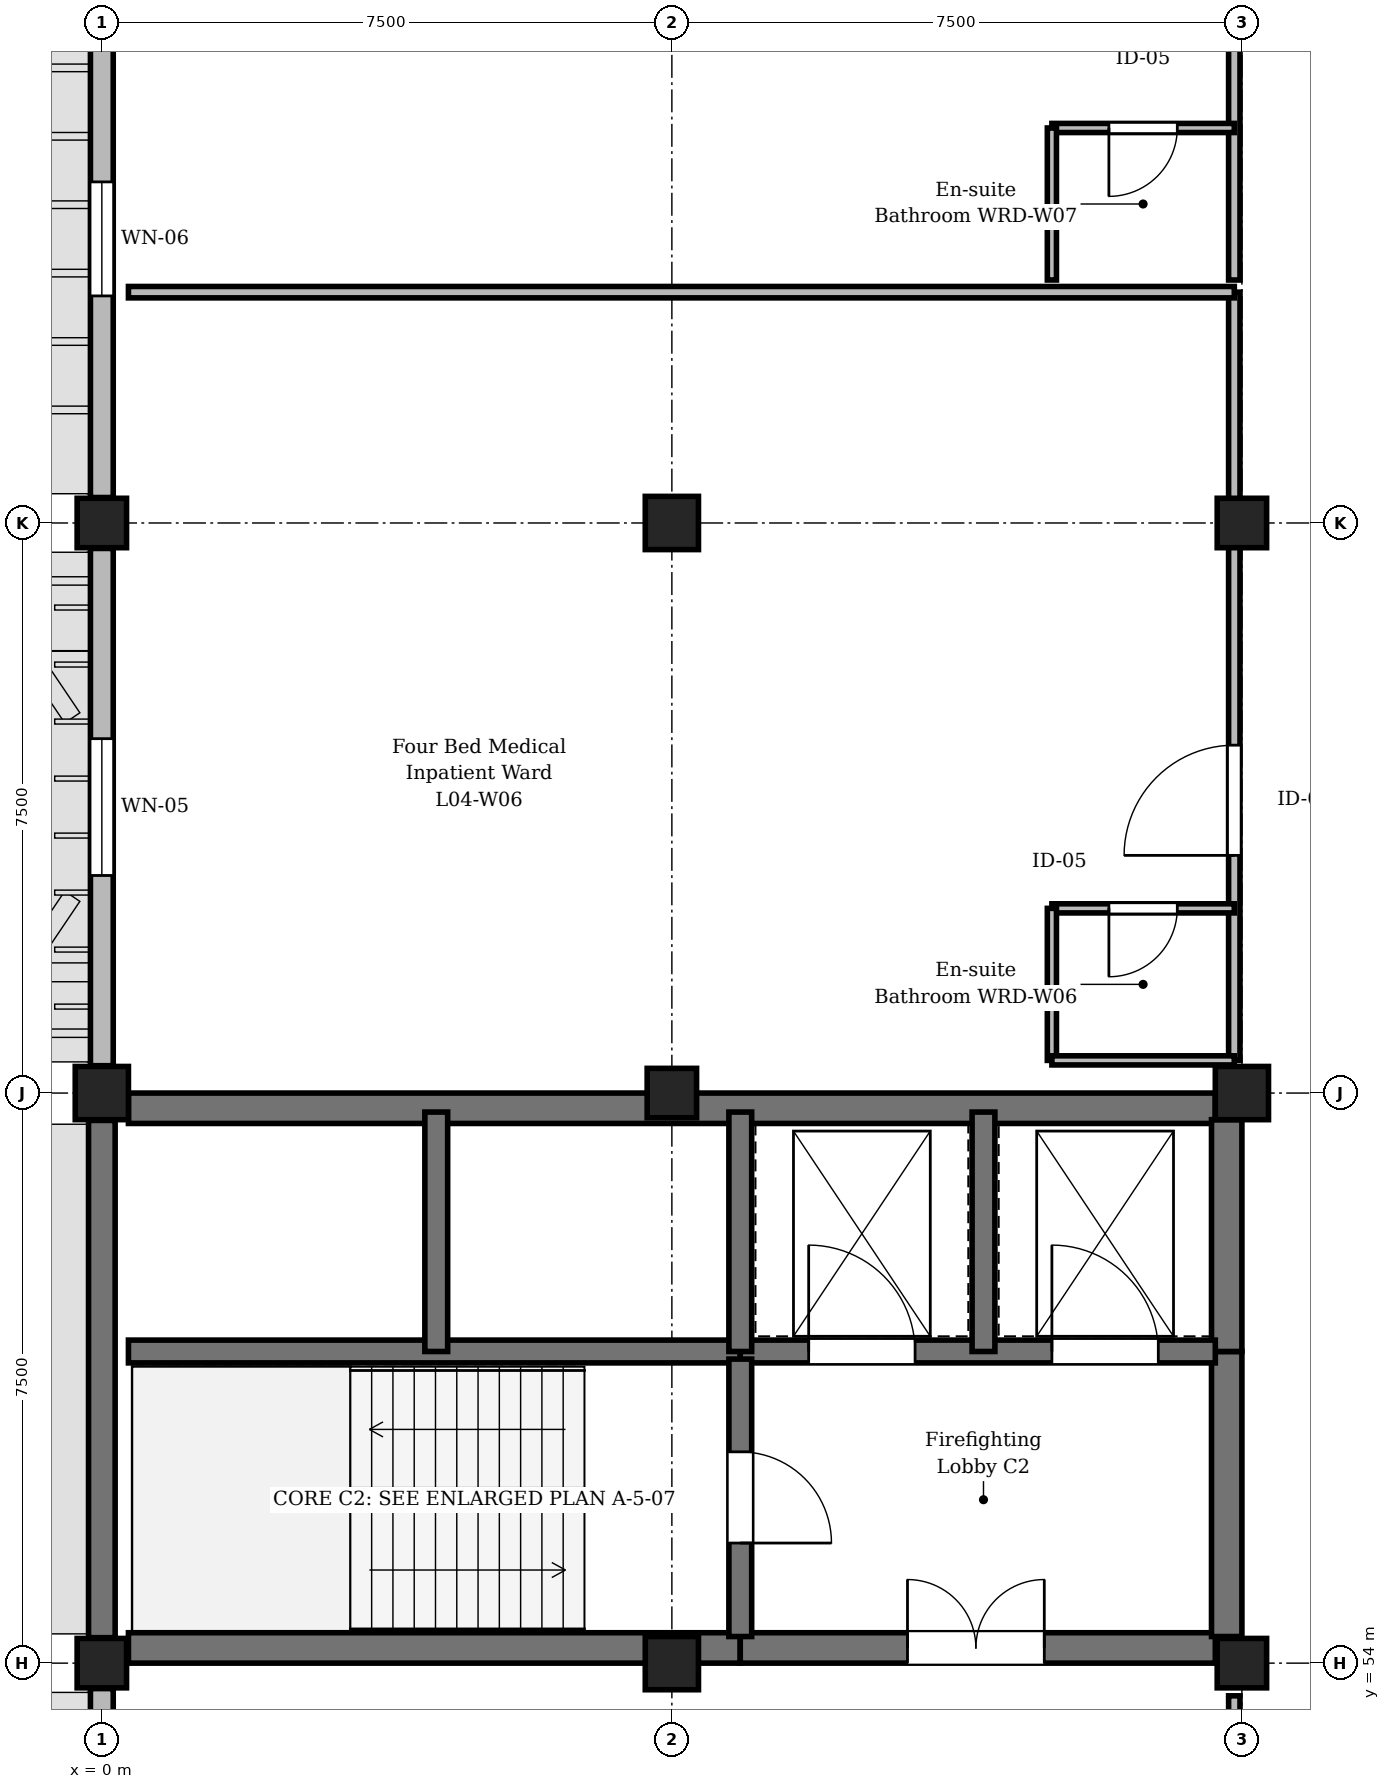
"""IFC4 building model, lengths in metres.
Left out: names, types, materials, properties, quantities, classifications, styles, units other than length and angle.
Written with IfcOpenShell. Run it as: python <this file> out.ifc"""

import sys

from ifc_helpers import new_model, si_unit, direction, frame, frame_2d, origin, origin_2d, place, context, subcontext, project, spatial, rectangle, extrude, element, fill, save


model = new_model("IFC4")
c1 = context("Model", 3, precision=1e-05, world=origin(), true_north=direction((0.0, 1.0)))
c2 = subcontext(c1, "Body", "Model", "MODEL_VIEW")
j1 = project(units=[si_unit("LENGTHUNIT", "METRE"), si_unit("PLANEANGLEUNIT", "RADIAN")], contexts=[c1])
p1 = place(None, origin())
s1 = spatial("IfcSite", under=j1, at=p1, CompositionType="ELEMENT")
p2 = place(p1, origin())
s2 = spatial("IfcBuilding", under=s1, at=p2, CompositionType="ELEMENT")
p3 = place(p2, frame((0.0, 0.0, 17.85)))
s3 = spatial("IfcBuildingStorey", under=s2, at=p3, CompositionType="ELEMENT", Elevation=17.85)
p4 = place(p3, frame((0.0, 54.0, 0.0), z_axis=(0.0, 0.0, 1.0), x_axis=(1.0, 0.0, 0.0)))
e1 = element("IfcColumn", 1, at=p4, inside=s3, PredefinedType="COLUMN", context=c2, shape_type="SweptSolid", body=[
    extrude(rectangle(XDim=0.65, YDim=0.65, at=origin_2d()), origin(), (0.0, 0.0, 1.0), 4.05),
])
p5 = place(p3, frame((0.0, 61.5, 0.0), z_axis=(0.0, 0.0, 1.0), x_axis=(1.0, 0.0, 0.0)))
e2 = element("IfcColumn", 2, at=p5, inside=s3, PredefinedType="COLUMN", context=c2, shape_type="SweptSolid", body=[
    extrude(rectangle(XDim=0.7, YDim=0.7, at=origin_2d()), origin(), (0.0, 0.0, 1.0), 4.05),
])
p6 = place(p3, frame((0.0, 69.0, 0.0), z_axis=(0.0, 0.0, 1.0), x_axis=(1.0, 0.0, 0.0)))
e3 = element("IfcColumn", 3, at=p6, inside=s3, PredefinedType="COLUMN", context=c2, shape_type="SweptSolid", body=[
    extrude(rectangle(XDim=0.65, YDim=0.65, at=origin_2d()), origin(), (0.0, 0.0, 1.0), 4.05),
])
p7 = place(p3, frame((7.5, 54.0, 0.0), z_axis=(0.0, 0.0, 1.0), x_axis=(1.0, 0.0, 0.0)))
e4 = element("IfcColumn", 4, at=p7, inside=s3, PredefinedType="COLUMN", context=c2, shape_type="SweptSolid", body=[
    extrude(rectangle(XDim=0.7, YDim=0.7, at=origin_2d()), origin(), (0.0, 0.0, 1.0), 4.05),
])
p8 = place(p3, frame((7.5, 61.5, 0.0), z_axis=(0.0, 0.0, 1.0), x_axis=(1.0, 0.0, 0.0)))
e5 = element("IfcColumn", 5, at=p8, inside=s3, PredefinedType="COLUMN", context=c2, shape_type="SweptSolid", body=[
    extrude(rectangle(XDim=0.65, YDim=0.65, at=origin_2d()), origin(), (0.0, 0.0, 1.0), 4.05),
])
p9 = place(p3, frame((7.5, 69.0, 0.0), z_axis=(0.0, 0.0, 1.0), x_axis=(1.0, 0.0, 0.0)))
e6 = element("IfcColumn", 6, at=p9, inside=s3, PredefinedType="COLUMN", context=c2, shape_type="SweptSolid", body=[
    extrude(rectangle(XDim=0.7, YDim=0.7, at=origin_2d()), origin(), (0.0, 0.0, 1.0), 4.05),
])
p10 = place(p3, frame((15.0, 54.0, 0.0), z_axis=(0.0, 0.0, 1.0), x_axis=(1.0, 0.0, 0.0)))
e7 = element("IfcColumn", 7, at=p10, inside=s3, PredefinedType="COLUMN", context=c2, shape_type="SweptSolid", body=[
    extrude(rectangle(XDim=0.65, YDim=0.65, at=origin_2d()), origin(), (0.0, 0.0, 1.0), 4.05),
])
p11 = place(p3, frame((15.0, 61.5, 0.0), z_axis=(0.0, 0.0, 1.0), x_axis=(1.0, 0.0, 0.0)))
e8 = element("IfcColumn", 8, at=p11, inside=s3, PredefinedType="COLUMN", context=c2, shape_type="SweptSolid", body=[
    extrude(rectangle(XDim=0.7, YDim=0.7, at=origin_2d()), origin(), (0.0, 0.0, 1.0), 4.05),
])
p12 = place(p3, frame((15.0, 69.0, 0.0), z_axis=(0.0, 0.0, 1.0), x_axis=(1.0, 0.0, 0.0)))
e9 = element("IfcColumn", 9, at=p12, inside=s3, PredefinedType="COLUMN", context=c2, shape_type="SweptSolid", body=[
    extrude(rectangle(XDim=0.65, YDim=0.65, at=origin_2d()), origin(), (0.0, 0.0, 1.0), 4.05),
])
p13 = place(p3, frame((0.0, 46.86, 0.0), z_axis=(0.0, 0.0, 1.0), x_axis=(0.0, 1.0, 0.0)))
e10 = element("IfcWall", 10, at=p13, inside=s3, PredefinedType="STANDARD", context=c2, shape_type="SweptSolid", body=[
    extrude(rectangle(XDim=6.805, YDim=0.3, at=frame_2d((3.402, 0.0))), origin(), (0.0, 0.0, 1.0), 3.17),
])
p14 = place(p13, frame((2.353, 0.0, 0.9)))
e11 = element("IfcOpeningElement", 11, at=p14, cuts=e10, PredefinedType="OPENING", context=c2, shape_type="SweptSolid", body=[
    extrude(rectangle(XDim=2.1, YDim=1.99, at=frame_2d((1.05, 0.995))), frame((0.0, 0.16, 0.0), z_axis=(0.0, -1.0, 0.0), x_axis=(1.0, 0.0, 0.0)), (0.0, 0.0, 1.0), 0.32),
])
p15 = place(p3, frame((0.0, 54.335, 0.0), z_axis=(0.0, 0.0, 1.0), x_axis=(0.0, 1.0, 0.0)))
e12 = element("IfcWall", 12, at=p15, inside=s3, PredefinedType="SHEAR", context=c2, shape_type="SweptSolid", body=[
    extrude(rectangle(XDim=6.805, YDim=0.35, at=frame_2d((3.402, 0.0))), origin(), (0.0, 0.0, 1.0), 3.77),
])
p16 = place(p3, frame((0.0, 61.86, 0.0), z_axis=(0.0, 0.0, 1.0), x_axis=(0.0, 1.0, 0.0)))
e13 = element("IfcWall", 13, at=p16, inside=s3, PredefinedType="STANDARD", context=c2, shape_type="SweptSolid", body=[
    extrude(rectangle(XDim=6.805, YDim=0.3, at=frame_2d((3.402, 0.0))), origin(), (0.0, 0.0, 1.0), 3.17),
])
p17 = place(p16, frame((2.502, 0.0, 0.9)))
e14 = element("IfcOpeningElement", 14, at=p17, cuts=e13, PredefinedType="OPENING", context=c2, shape_type="SweptSolid", body=[
    extrude(rectangle(XDim=1.8, YDim=1.99, at=frame_2d((0.9, 0.995))), frame((0.0, 0.16, 0.0), z_axis=(0.0, -1.0, 0.0), x_axis=(1.0, 0.0, 0.0)), (0.0, 0.0, 1.0), 0.32),
])
p18 = place(p3, frame((0.0, 69.335, 0.0), z_axis=(0.0, 0.0, 1.0), x_axis=(0.0, 1.0, 0.0)))
e15 = element("IfcWall", 15, at=p18, inside=s3, PredefinedType="STANDARD", context=c2, shape_type="SweptSolid", body=[
    extrude(rectangle(XDim=6.805, YDim=0.3, at=frame_2d((3.402, 0.0))), origin(), (0.0, 0.0, 1.0), 3.17),
])
p19 = place(p18, frame((2.653, 0.0, 0.9)))
e16 = element("IfcOpeningElement", 16, at=p19, cuts=e15, PredefinedType="OPENING", context=c2, shape_type="SweptSolid", body=[
    extrude(rectangle(XDim=1.5, YDim=1.99, at=frame_2d((0.75, 0.995))), frame((0.0, 0.16, 0.0), z_axis=(0.0, -1.0, 0.0), x_axis=(1.0, 0.0, 0.0)), (0.0, 0.0, 1.0), 0.32),
])
p20 = place(p3, frame((0.35, 54.2, 0.0), z_axis=(0.0, 0.0, 1.0), x_axis=(1.0, 0.0, 0.0)))
e17 = element("IfcWall", 17, at=p20, inside=s3, PredefinedType="SHEAR", context=c2, shape_type="SweptSolid", body=[
    extrude(rectangle(XDim=8.05, YDim=0.4, at=frame_2d((4.025, 0.0))), origin(), (0.0, 0.0, 1.0), 3.77),
])
p21 = place(p3, frame((8.4, 54.2, 0.0), z_axis=(0.0, 0.0, 1.0), x_axis=(1.0, 0.0, 0.0)))
e18 = element("IfcWall", 18, at=p21, inside=s3, PredefinedType="SHEAR", context=c2, shape_type="SweptSolid", body=[
    extrude(rectangle(XDim=6.25, YDim=0.4, at=frame_2d((3.125, 0.0))), origin(), (0.0, 0.0, 1.0), 3.77),
])
p22 = place(p21, frame((2.2, 0.0, 0.0)))
e19 = element("IfcOpeningElement", 19, at=p22, cuts=e18, PredefinedType="OPENING", context=c2, shape_type="SweptSolid", body=[
    extrude(rectangle(XDim=1.8, YDim=2.25, at=frame_2d((0.9, 1.125))), frame((0.0, 0.21, 0.0), z_axis=(0.0, -1.0, 0.0), x_axis=(1.0, 0.0, 0.0)), (0.0, 0.0, 1.0), 0.42),
])
p23 = place(p3, frame((0.35, 61.3, 0.0), z_axis=(0.0, 0.0, 1.0), x_axis=(1.0, 0.0, 0.0)))
e20 = element("IfcWall", 20, at=p23, inside=s3, PredefinedType="SHEAR", context=c2, shape_type="SweptSolid", body=[
    extrude(rectangle(XDim=14.3, YDim=0.4, at=frame_2d((7.15, 0.0))), origin(), (0.0, 0.0, 1.0), 3.77),
])
p24 = place(p3, frame((14.8, 54.35, 0.0), z_axis=(0.0, 0.0, 1.0), x_axis=(0.0, 1.0, 0.0)))
e21 = element("IfcWall", 21, at=p24, inside=s3, PredefinedType="SHEAR", context=c2, shape_type="SweptSolid", body=[
    extrude(rectangle(XDim=3.75, YDim=0.4, at=frame_2d((1.875, 0.0))), origin(), (0.0, 0.0, 1.0), 3.77),
])
p25 = place(p3, frame((14.8, 58.1, 0.0), z_axis=(0.0, 0.0, 1.0), x_axis=(0.0, 1.0, 0.0)))
e22 = element("IfcWall", 22, at=p25, inside=s3, PredefinedType="SHEAR", context=c2, shape_type="SweptSolid", body=[
    extrude(rectangle(XDim=3.05, YDim=0.4, at=frame_2d((1.525, 0.0))), origin(), (0.0, 0.0, 1.0), 3.77),
])
p26 = place(p3, frame((0.35, 58.1, 0.0), z_axis=(0.0, 0.0, 1.0), x_axis=(1.0, 0.0, 0.0)))
e23 = element("IfcWall", 23, at=p26, inside=s3, PredefinedType="SHEAR", context=c2, shape_type="SweptSolid", body=[
    extrude(rectangle(XDim=8.05, YDim=0.3, at=frame_2d((4.025, 0.0))), origin(), (0.0, 0.0, 1.0), 3.77),
])
p27 = place(p3, frame((8.4, 58.1, 0.0), z_axis=(0.0, 0.0, 1.0), x_axis=(1.0, 0.0, 0.0)))
e24 = element("IfcWall", 24, at=p27, inside=s3, PredefinedType="SHEAR", context=c2, shape_type="SweptSolid", body=[
    extrude(rectangle(XDim=6.25, YDim=0.3, at=frame_2d((3.125, 0.0))), origin(), (0.0, 0.0, 1.0), 3.77),
])
p28 = place(p27, frame((0.9, 0.0, 0.0)))
e25 = element("IfcOpeningElement", 25, at=p28, cuts=e24, PredefinedType="OPENING", context=c2, shape_type="SweptSolid", body=[
    extrude(rectangle(XDim=1.4, YDim=2.25, at=frame_2d((0.7, 1.125))), frame((0.0, 0.16, 0.0), z_axis=(0.0, -1.0, 0.0), x_axis=(1.0, 0.0, 0.0)), (0.0, 0.0, 1.0), 0.32),
])
p29 = place(p27, frame((4.1, 0.0, 0.0)))
e26 = element("IfcOpeningElement", 26, at=p29, cuts=e24, PredefinedType="OPENING", context=c2, shape_type="SweptSolid", body=[
    extrude(rectangle(XDim=1.4, YDim=2.25, at=frame_2d((0.7, 1.125))), frame((0.0, 0.16, 0.0), z_axis=(0.0, -1.0, 0.0), x_axis=(1.0, 0.0, 0.0)), (0.0, 0.0, 1.0), 0.32),
])
p30 = place(p3, frame((8.4, 58.0, 0.0), z_axis=(0.0, 0.0, 1.0), x_axis=(0.0, -1.0, 0.0)))
e27 = element("IfcWall", 27, at=p30, inside=s3, PredefinedType="SHEAR", context=c2, shape_type="SweptSolid", body=[
    extrude(rectangle(XDim=3.65, YDim=0.3, at=frame_2d((1.825, 0.0))), origin(), (0.0, 0.0, 1.0), 3.77),
])
p31 = place(p30, frame((1.22, 0.0, 0.0)))
e28 = element("IfcOpeningElement", 28, at=p31, cuts=e27, PredefinedType="OPENING", context=c2, shape_type="SweptSolid", body=[
    extrude(rectangle(XDim=1.2, YDim=2.25, at=frame_2d((0.6, 1.125))), frame((0.0, 0.16, 0.0), z_axis=(0.0, -1.0, 0.0), x_axis=(1.0, 0.0, 0.0)), (0.0, 0.0, 1.0), 0.32),
])
for number, where, z_axis, x_axis in (
    (29, (4.4, 58.1, 0.0), (0.0, 0.0, 1.0), (0.0, 1.0, 0.0)),
    (30, (8.4, 58.1, 0.0), (0.0, 0.0, 1.0), (0.0, 1.0, 0.0)),
    (31, (11.6, 58.1, 0.0), (0.0, 0.0, 1.0), (0.0, 1.0, 0.0)),
):
    element("IfcWall", number, at=place(p3, frame(where, z_axis=z_axis, x_axis=x_axis)), inside=s3, PredefinedType="SHEAR", context=c2, shape_type="SweptSolid", body=[
        extrude(rectangle(XDim=3.15, YDim=0.3, at=frame_2d((1.575, 0.0))), origin(), (0.0, 0.0, 1.0), 3.77),
    ])
p32 = place(p3, frame((14.9, 44.155, 0.0), z_axis=(0.0, 0.0, 1.0), x_axis=(0.0, 1.0, 0.0)))
e32 = element("IfcWall", 32, at=p32, inside=s3, PredefinedType="PARTITIONING", context=c2, shape_type="SweptSolid", body=[
    extrude(rectangle(XDim=9.415, YDim=0.15, at=frame_2d((4.708, 0.0))), origin(), (0.0, 0.0, 1.0), 3.205),
])
p33 = place(p32, frame((5.545, 0.0, 0.0)))
e33 = element("IfcOpeningElement", 33, at=p33, cuts=e32, PredefinedType="OPENING", context=c2, shape_type="SweptSolid", body=[
    extrude(rectangle(XDim=1.35, YDim=2.25, at=frame_2d((0.675, 1.125))), frame((0.0, 0.085, 0.0), z_axis=(0.0, -1.0, 0.0), x_axis=(1.0, 0.0, 0.0)), (0.0, 0.0, 1.0), 0.17),
])
p34 = place(p3, frame((14.9, 61.93, 0.0), z_axis=(0.0, 0.0, 1.0), x_axis=(0.0, 1.0, 0.0)))
e34 = element("IfcWall", 34, at=p34, inside=s3, PredefinedType="PARTITIONING", context=c2, shape_type="SweptSolid", body=[
    extrude(rectangle(XDim=10.107, YDim=0.15, at=frame_2d((5.053, 0.0))), origin(), (0.0, 0.0, 1.0), 3.205),
])
p35 = place(p34, frame((2.697, 0.0, 0.0)))
e35 = element("IfcOpeningElement", 35, at=p35, cuts=e34, PredefinedType="OPENING", context=c2, shape_type="SweptSolid", body=[
    extrude(rectangle(XDim=1.45, YDim=2.3, at=frame_2d((0.725, 1.15))), frame((0.0, 0.085, 0.0), z_axis=(0.0, -1.0, 0.0), x_axis=(1.0, 0.0, 0.0)), (0.0, 0.0, 1.0), 0.17),
])
p36 = place(p3, frame((14.9, 63.93, 0.0), z_axis=(0.0, 0.0, 1.0), x_axis=(-1.0, 0.0, 0.0)))
e36 = element("IfcWall", 36, at=p36, inside=s3, PredefinedType="PARTITIONING", context=c2, shape_type="SweptSolid", body=[
    extrude(rectangle(XDim=2.4, YDim=0.12, at=frame_2d((1.2, 0.0))), origin(), (0.0, 0.0, 1.0), 3.755),
])
p37 = place(p36, frame((0.75, 0.0, 0.0)))
e37 = element("IfcOpeningElement", 37, at=p37, cuts=e36, PredefinedType="OPENING", context=c2, shape_type="SweptSolid", body=[
    extrude(rectangle(XDim=0.9, YDim=2.1, at=frame_2d((0.45, 1.05))), frame((0.0, 0.07, 0.0), z_axis=(0.0, -1.0, 0.0), x_axis=(1.0, 0.0, 0.0)), (0.0, 0.0, 1.0), 0.14),
])
p38 = place(p3, frame((12.5, 61.93, 0.0), z_axis=(0.0, 0.0, 1.0), x_axis=(0.0, 1.0, 0.0)))
e38 = element("IfcWall", 38, at=p38, inside=s3, PredefinedType="PARTITIONING", context=c2, shape_type="SweptSolid", body=[
    extrude(rectangle(XDim=2.0, YDim=0.12, at=frame_2d((1.0, 0.0))), origin(), (0.0, 0.0, 1.0), 3.755),
])
p39 = place(p3, frame((14.9, 72.197, 0.0), z_axis=(0.0, 0.0, 1.0), x_axis=(0.0, 1.0, 0.0)))
e39 = element("IfcWall", 39, at=p39, inside=s3, PredefinedType="PARTITIONING", context=c2, shape_type="SweptSolid", body=[
    extrude(rectangle(XDim=10.106, YDim=0.15, at=frame_2d((5.053, 0.0))), origin(), (0.0, 0.0, 1.0), 3.055),
])
p40 = place(p39, frame((8.507, 0.0, 0.0)))
e40 = element("IfcOpeningElement", 40, at=p40, cuts=e39, PredefinedType="OPENING", context=c2, shape_type="SweptSolid", body=[
    extrude(rectangle(XDim=1.35, YDim=2.25, at=frame_2d((0.675, 1.125))), frame((0.0, 0.085, 0.0), z_axis=(0.0, -1.0, 0.0), x_axis=(1.0, 0.0, 0.0)), (0.0, 0.0, 1.0), 0.17),
])
p41 = place(p3, frame((14.9, 74.197, 0.0), z_axis=(0.0, 0.0, 1.0), x_axis=(-1.0, 0.0, 0.0)))
e41 = element("IfcWall", 41, at=p41, inside=s3, PredefinedType="PARTITIONING", context=c2, shape_type="SweptSolid", body=[
    extrude(rectangle(XDim=2.4, YDim=0.12, at=frame_2d((1.2, 0.0))), origin(), (0.0, 0.0, 1.0), 3.755),
])
p42 = place(p41, frame((0.75, 0.0, 0.0)))
e42 = element("IfcOpeningElement", 42, at=p42, cuts=e41, PredefinedType="OPENING", context=c2, shape_type="SweptSolid", body=[
    extrude(rectangle(XDim=0.9, YDim=2.1, at=frame_2d((0.45, 1.05))), frame((0.0, 0.07, 0.0), z_axis=(0.0, -1.0, 0.0), x_axis=(1.0, 0.0, 0.0)), (0.0, 0.0, 1.0), 0.14),
])
p43 = place(p3, frame((12.5, 72.197, 0.0), z_axis=(0.0, 0.0, 1.0), x_axis=(0.0, 1.0, 0.0)))
e43 = element("IfcWall", 43, at=p43, inside=s3, PredefinedType="PARTITIONING", context=c2, shape_type="SweptSolid", body=[
    extrude(rectangle(XDim=2.0, YDim=0.12, at=frame_2d((1.0, 0.0))), origin(), (0.0, 0.0, 1.0), 3.755),
])
p44 = place(p3, frame((0.35, 72.037, 0.0), z_axis=(0.0, 0.0, 1.0), x_axis=(1.0, 0.0, 0.0)))
e44 = element("IfcWall", 44, at=p44, inside=s3, PredefinedType="PARTITIONING", context=c2, shape_type="SweptSolid", body=[
    extrude(rectangle(XDim=14.55, YDim=0.15, at=frame_2d((7.275, 0.0))), origin(), (0.0, 0.0, 1.0), 3.755),
])
p45 = place(p3, frame((12.5, 61.93, 0.0), z_axis=(0.0, 0.0, 1.0), x_axis=(1.0, 0.0, 0.0)))
e45 = element("IfcWall", 45, at=p45, inside=s3, PredefinedType="PARTITIONING", context=c2, shape_type="SweptSolid", body=[
    extrude(rectangle(XDim=2.4, YDim=0.12, at=frame_2d((1.2, 0.0))), origin(), (0.0, 0.0, 1.0), 3.755),
])
p46 = place(p17, origin())
e46 = element("IfcWindow", 46, at=p46, inside=s3, PartitioningType="SINGLE_PANEL", PredefinedType="WINDOW", context=c2, shape_type="SweptSolid", body=[
    extrude(rectangle(XDim=1.8, YDim=1.99, at=frame_2d((0.9, 0.995))), frame((0.0, 0.03, 0.0), z_axis=(0.0, -1.0, 0.0), x_axis=(1.0, 0.0, 0.0)), (0.0, 0.0, 1.0), 0.06),
])
fill(e14, e46)
p47 = place(p19, origin())
e47 = element("IfcWindow", 47, at=p47, inside=s3, PartitioningType="SINGLE_PANEL", PredefinedType="WINDOW", context=c2, shape_type="SweptSolid", body=[
    extrude(rectangle(XDim=1.5, YDim=1.99, at=frame_2d((0.75, 0.995))), frame((0.0, 0.03, 0.0), z_axis=(0.0, -1.0, 0.0), x_axis=(1.0, 0.0, 0.0)), (0.0, 0.0, 1.0), 0.06),
])
fill(e16, e47)
p48 = place(p22, origin())
e48 = element("IfcDoor", 48, at=p48, inside=s3, OperationType="DOUBLE_DOOR_SINGLE_SWING", PredefinedType="DOOR", context=c2, shape_type="SweptSolid", body=[
    extrude(rectangle(XDim=1.8, YDim=2.25, at=frame_2d((0.9, 1.125))), frame((0.0, 0.025, 0.0), z_axis=(0.0, -1.0, 0.0), x_axis=(1.0, 0.0, 0.0)), (0.0, 0.0, 1.0), 0.05),
])
fill(e19, e48)
p49 = place(p28, origin())
e49 = element("IfcDoor", 49, at=p49, inside=s3, OperationType="DOUBLE_DOOR_SLIDING", PredefinedType="DOOR", context=c2, shape_type="SweptSolid", body=[
    extrude(rectangle(XDim=1.4, YDim=2.25, at=frame_2d((0.7, 1.125))), frame((0.0, 0.025, 0.0), z_axis=(0.0, -1.0, 0.0), x_axis=(1.0, 0.0, 0.0)), (0.0, 0.0, 1.0), 0.05),
])
fill(e25, e49)
p50 = place(p29, origin())
e50 = element("IfcDoor", 50, at=p50, inside=s3, OperationType="DOUBLE_DOOR_SLIDING", PredefinedType="DOOR", context=c2, shape_type="SweptSolid", body=[
    extrude(rectangle(XDim=1.4, YDim=2.25, at=frame_2d((0.7, 1.125))), frame((0.0, 0.025, 0.0), z_axis=(0.0, -1.0, 0.0), x_axis=(1.0, 0.0, 0.0)), (0.0, 0.0, 1.0), 0.05),
])
fill(e26, e50)
p51 = place(p31, origin())
e51 = element("IfcDoor", 51, at=p51, inside=s3, OperationType="SINGLE_SWING_RIGHT", PredefinedType="DOOR", context=c2, shape_type="SweptSolid", body=[
    extrude(rectangle(XDim=1.2, YDim=2.25, at=frame_2d((0.6, 1.125))), frame((0.0, 0.025, 0.0), z_axis=(0.0, -1.0, 0.0), x_axis=(1.0, 0.0, 0.0)), (0.0, 0.0, 1.0), 0.05),
])
fill(e28, e51)
p52 = place(p35, origin())
e52 = element("IfcDoor", 52, at=p52, inside=s3, OperationType="SINGLE_SWING_LEFT", PredefinedType="DOOR", context=c2, shape_type="SweptSolid", body=[
    extrude(rectangle(XDim=1.45, YDim=2.3, at=frame_2d((0.725, 1.15))), frame((0.0, 0.025, 0.0), z_axis=(0.0, -1.0, 0.0), x_axis=(1.0, 0.0, 0.0)), (0.0, 0.0, 1.0), 0.05),
])
fill(e35, e52)
p53 = place(p37, origin())
e53 = element("IfcDoor", 53, at=p53, inside=s3, OperationType="SINGLE_SWING_RIGHT", PredefinedType="DOOR", context=c2, shape_type="SweptSolid", body=[
    extrude(rectangle(XDim=0.9, YDim=2.1, at=frame_2d((0.45, 1.05))), frame((0.0, 0.025, 0.0), z_axis=(0.0, -1.0, 0.0), x_axis=(1.0, 0.0, 0.0)), (0.0, 0.0, 1.0), 0.05),
])
fill(e37, e53)
p54 = place(p42, origin())
e54 = element("IfcDoor", 54, at=p54, inside=s3, OperationType="SINGLE_SWING_RIGHT", PredefinedType="DOOR", context=c2, shape_type="SweptSolid", body=[
    extrude(rectangle(XDim=0.9, YDim=2.1, at=frame_2d((0.45, 1.05))), frame((0.0, 0.025, 0.0), z_axis=(0.0, -1.0, 0.0), x_axis=(1.0, 0.0, 0.0)), (0.0, 0.0, 1.0), 0.05),
])
fill(e42, e54)
save(model, sys.argv[1])
